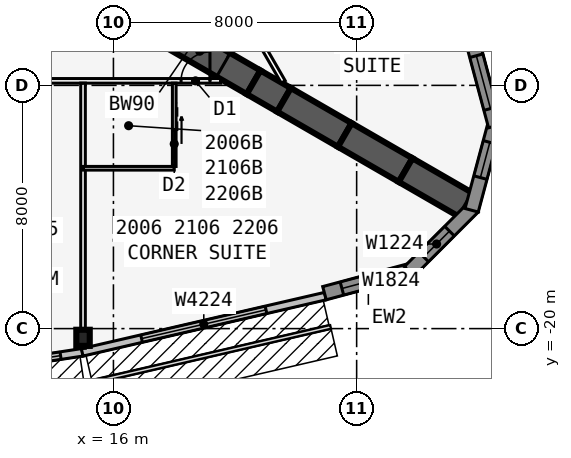
"""IFC4 building model, lengths in metres.
Left out: names, types, materials, properties, quantities, classifications, styles, units other than length and angle.
Written with IfcOpenShell. Run it as: python <this file> out.ifc"""

import sys

from ifc_helpers import new_model, si_unit, direction, frame, frame_2d, origin, origin_2d, place, context, subcontext, project, spatial, polyline, rectangle, i_section, outline, extrude, element, fill, save


model = new_model("IFC4")
c1 = context("Model", 3, precision=1e-05, world=origin(), true_north=direction((0.0, 1.0)))
c2 = subcontext(c1, "Body", "Model", "MODEL_VIEW")
j1 = project(units=[si_unit("LENGTHUNIT", "METRE"), si_unit("PLANEANGLEUNIT", "RADIAN")], contexts=[c1])
p1 = place(None, origin())
s1 = spatial("IfcSite", under=j1, at=p1, CompositionType="ELEMENT")
p2 = place(p1, origin())
s2 = spatial("IfcBuilding", under=s1, at=p2, CompositionType="ELEMENT")
p3 = place(p2, frame((0.0, 0.0, 79.5)))
s3 = spatial("IfcBuildingStorey", under=s2, at=p3, CompositionType="ELEMENT", Elevation=79.5)
p4 = place(p3, frame((16.5, -9.526, 0.0), z_axis=(0.0, 0.0, 1.0), x_axis=(0.866031398331, -0.499989616998, 0.0)))
e1 = element("IfcWall", 1, at=p4, inside=s3, PredefinedType="SHEAR", context=c2, shape_type="SweptSolid", body=[
    extrude(rectangle(XDim=4.746, YDim=0.9, at=frame_2d((2.373, 0.0))), origin(), (0.0, 0.0, 1.0), 3.4),
])
p5 = place(p4, frame((1.8, 0.0, 0.0)))
e2 = element("IfcOpeningElement", 2, at=p5, cuts=e1, PredefinedType="OPENING", context=c2, shape_type="SweptSolid", body=[
    extrude(rectangle(XDim=1.8, YDim=2.13, at=frame_2d((0.9, 1.065))), frame((0.0, 0.46, 0.0), z_axis=(0.0, -1.0, 0.0), x_axis=(1.0, 0.0, 0.0)), (0.0, 0.0, 1.0), 0.92),
])
p6 = place(p3, frame((20.61, -11.899, 0.0), z_axis=(0.0, 0.0, 1.0), x_axis=(0.866009537788, -0.500027479704, 0.0)))
e3 = element("IfcWall", 3, at=p6, inside=s3, PredefinedType="SHEAR", context=c2, shape_type="SweptSolid", body=[
    extrude(rectangle(XDim=1.155, YDim=0.9, at=frame_2d((0.577, 0.0))), origin(), (0.0, 0.0, 1.0), 3.4),
])
for number, where, z_axis, x_axis in (
    (4, (21.61, -12.477, 0.0), (0.0, 0.0, 1.0), (0.866, -0.5, 0.0)),
    (5, (23.61, -13.631, 0.0), (0.0, 0.0, 1.0), (0.866, -0.5, 0.0)),
    (6, (25.61, -14.786, 0.0), (0.0, 0.0, 1.0), (0.866, -0.5, 0.0)),
):
    element("IfcWall", number, at=place(p3, frame(where, z_axis=z_axis, x_axis=x_axis)), inside=s3, PredefinedType="SHEAR", context=c2, shape_type="SweptSolid", body=[
        extrude(rectangle(XDim=2.309, YDim=0.9, at=frame_2d((1.155, 0.0))), origin(), (0.0, 0.0, 1.0), 3.4),
    ])
p7 = place(p3, frame((15.0, -20.303, 0.0), z_axis=(0.0, 0.0, 1.0), x_axis=(1.0, 0.0, 0.0)))
e7 = element("IfcColumn", 7, at=p7, inside=s3, PredefinedType="COLUMN", context=c2, shape_type="SweptSolid", body=[
    extrude(i_section(OverallWidth=0.442, OverallDepth=0.531, WebThickness=0.066, FlangeThickness=0.106, at=origin_2d()), origin(), (0.0, 0.0, 1.0), 3.4),
])
p8 = place(p3, frame((9.981, -21.54, 0.0), z_axis=(0.0, 0.0, 1.0), x_axis=(0.988615403399, 0.150464561152, 0.0)))
e8 = element("IfcWall", 8, at=p8, inside=s3, PredefinedType="STANDARD", context=c2, shape_type="SweptSolid", body=[
    extrude(rectangle(XDim=5.058, YDim=0.25, at=frame_2d((2.529, 0.0))), origin(), (0.0, 0.0, 1.0), 3.235),
])
p9 = place(p8, frame((0.729, 0.0, 0.45)))
e9 = element("IfcOpeningElement", 9, at=p9, cuts=e8, PredefinedType="OPENING", context=c2, shape_type="SweptSolid", body=[
    extrude(rectangle(XDim=3.6, YDim=2.4, at=frame_2d((1.8, 1.2))), frame((0.0, 0.135, 0.0), z_axis=(0.0, -1.0, 0.0), x_axis=(1.0, 0.0, 0.0)), (0.0, 0.0, 1.0), 0.27),
])
p10 = place(p3, frame((14.972, -20.781, 0.0), z_axis=(0.0, 0.0, 1.0), x_axis=(0.974279327392, 0.225343720163, 0.0)))
e10 = element("IfcWall", 10, at=p10, inside=s3, PredefinedType="STANDARD", context=c2, shape_type="SweptSolid", body=[
    extrude(rectangle(XDim=8.211, YDim=0.25, at=frame_2d((4.105, 0.0))), origin(), (0.0, 0.0, 1.0), 3.235),
])
p11 = place(p10, frame((2.006, 0.0, 0.45)))
e11 = element("IfcOpeningElement", 11, at=p11, cuts=e10, PredefinedType="OPENING", context=c2, shape_type="SweptSolid", body=[
    extrude(rectangle(XDim=4.2, YDim=2.4, at=frame_2d((2.1, 1.2))), frame((0.0, 0.135, 0.0), z_axis=(0.0, -1.0, 0.0), x_axis=(1.0, 0.0, 0.0)), (0.0, 0.0, 1.0), 0.27),
])
p12 = place(p3, frame((22.942, -18.835, 0.0), z_axis=(0.0, 0.0, 1.0), x_axis=(0.965930548995, 0.258801419081, 0.0)))
e12 = element("IfcWall", 12, at=p12, inside=s3, PredefinedType="SOLIDWALL", context=c2, shape_type="SweptSolid", body=[
    extrude(rectangle(XDim=2.989, YDim=0.45, at=frame_2d((1.494, 0.0))), origin(), (0.0, 0.0, 1.0), 3.235),
])
p13 = place(p12, frame((0.594, 0.0, 0.45)))
e13 = element("IfcOpeningElement", 13, at=p13, cuts=e12, PredefinedType="OPENING", context=c2, shape_type="SweptSolid", body=[
    extrude(rectangle(XDim=1.8, YDim=2.4, at=frame_2d((0.9, 1.2))), frame((0.0, 0.235, 0.0), z_axis=(0.0, -1.0, 0.0), x_axis=(1.0, 0.0, 0.0)), (0.0, 0.0, 1.0), 0.47),
])
p14 = place(p3, frame((25.728, -18.12, 0.0), z_axis=(0.0, 0.0, 1.0), x_axis=(0.707025086683, 0.707188466253, 0.0)))
e14 = element("IfcWall", 14, at=p14, inside=s3, PredefinedType="SOLIDWALL", context=c2, shape_type="SweptSolid", body=[
    extrude(outline(polyline([(2.989, 0.225), (2.93, 0.225), (2.438, 0.093), (2.402, 0.225), (0.0, 0.225), (0.0, -0.225), (2.989, -0.225), (2.989, 0.225)])), origin(), (0.0, 0.0, 1.0), 3.235),
])
p15 = place(p14, frame((0.676, 0.0, 0.45)))
e15 = element("IfcOpeningElement", 15, at=p15, cuts=e14, PredefinedType="OPENING", context=c2, shape_type="SweptSolid", body=[
    extrude(rectangle(XDim=1.2, YDim=2.4, at=frame_2d((0.6, 1.2))), frame((0.0, 0.235, 0.0), z_axis=(0.0, -1.0, 0.0), x_axis=(1.0, 0.0, 0.0)), (0.0, 0.0, 1.0), 0.47),
])
p16 = place(p3, frame((27.783, -16.108, 0.0), z_axis=(0.0, 0.0, 1.0), x_axis=(0.258801419081, 0.965930548995, 0.0)))
e16 = element("IfcWall", 16, at=p16, inside=s3, PredefinedType="SOLIDWALL", context=c2, shape_type="SweptSolid", body=[
    extrude(outline(polyline([(2.989, 0.225), (0.586, 0.225), (0.551, 0.093), (0.06, 0.225), (0.0, 0.225), (0.0, -0.225), (2.989, -0.225), (2.989, 0.225)])), origin(), (0.0, 0.0, 1.0), 3.235),
])
p17 = place(p16, frame((1.113, 0.0, 0.45)))
e17 = element("IfcOpeningElement", 17, at=p17, cuts=e16, PredefinedType="OPENING", context=c2, shape_type="SweptSolid", body=[
    extrude(rectangle(XDim=1.2, YDim=2.4, at=frame_2d((0.6, 1.2))), frame((0.0, 0.235, 0.0), z_axis=(0.0, -1.0, 0.0), x_axis=(1.0, 0.0, 0.0)), (0.0, 0.0, 1.0), 0.47),
])
p18 = place(p3, frame((28.556, -13.337, 0.0), z_axis=(0.0, 0.0, 1.0), x_axis=(-0.258780998834, 0.965936019953, 0.0)))
e18 = element("IfcWall", 18, at=p18, inside=s3, PredefinedType="SOLIDWALL", context=c2, shape_type="SweptSolid", body=[
    extrude(rectangle(XDim=2.989, YDim=0.45, at=frame_2d((1.494, 0.0))), origin(), (0.0, 0.0, 1.0), 3.235),
])
p19 = place(p18, frame((0.594, 0.0, 0.45)))
e19 = element("IfcOpeningElement", 19, at=p19, cuts=e18, PredefinedType="OPENING", context=c2, shape_type="SweptSolid", body=[
    extrude(rectangle(XDim=1.8, YDim=2.4, at=frame_2d((0.9, 1.2))), frame((0.0, 0.235, 0.0), z_axis=(0.0, -1.0, 0.0), x_axis=(1.0, 0.0, 0.0)), (0.0, 0.0, 1.0), 0.47),
])
p20 = place(p3, frame((-19.527, -11.851, 0.0), z_axis=(0.0, 0.0, 1.0), x_axis=(1.0, 0.0, 0.0)))
e20 = element("IfcWall", 20, at=p20, inside=s3, PredefinedType="PARTITIONING", context=c2, shape_type="SweptSolid", body=[
    extrude(rectangle(XDim=39.054, YDim=0.15, at=frame_2d((19.527, 0.0))), origin(), (0.0, 0.0, 1.0), 3.235),
])
p21 = place(p20, frame((0.352, 0.0, 0.0)))
e21 = element("IfcOpeningElement", 21, at=p21, cuts=e20, PredefinedType="OPENING", context=c2, shape_type="SweptSolid", body=[
    extrude(rectangle(XDim=0.95, YDim=2.13, at=frame_2d((0.475, 1.065))), frame((0.0, 0.085, 0.0), z_axis=(0.0, -1.0, 0.0), x_axis=(1.0, 0.0, 0.0)), (0.0, 0.0, 1.0), 0.17),
])
p22 = place(p20, frame((7.752, 0.0, 0.0)))
e22 = element("IfcOpeningElement", 22, at=p22, cuts=e20, PredefinedType="OPENING", context=c2, shape_type="SweptSolid", body=[
    extrude(rectangle(XDim=0.95, YDim=2.13, at=frame_2d((0.475, 1.065))), frame((0.0, 0.085, 0.0), z_axis=(0.0, -1.0, 0.0), x_axis=(1.0, 0.0, 0.0)), (0.0, 0.0, 1.0), 0.17),
])
p23 = place(p20, frame((17.752, 0.0, 0.0)))
e23 = element("IfcOpeningElement", 23, at=p23, cuts=e20, PredefinedType="OPENING", context=c2, shape_type="SweptSolid", body=[
    extrude(rectangle(XDim=0.95, YDim=2.13, at=frame_2d((0.475, 1.065))), frame((0.0, 0.085, 0.0), z_axis=(0.0, -1.0, 0.0), x_axis=(1.0, 0.0, 0.0)), (0.0, 0.0, 1.0), 0.17),
])
p24 = place(p20, frame((21.527, 0.0, 0.0)))
e24 = element("IfcOpeningElement", 24, at=p24, cuts=e20, PredefinedType="OPENING", context=c2, shape_type="SweptSolid", body=[
    extrude(rectangle(XDim=1.0, YDim=2.13, at=frame_2d((0.5, 1.065))), frame((0.0, 0.085, 0.0), z_axis=(0.0, -1.0, 0.0), x_axis=(1.0, 0.0, 0.0)), (0.0, 0.0, 1.0), 0.17),
])
p25 = place(p20, frame((27.152, 0.0, 0.0)))
e25 = element("IfcOpeningElement", 25, at=p25, cuts=e20, PredefinedType="OPENING", context=c2, shape_type="SweptSolid", body=[
    extrude(rectangle(XDim=0.95, YDim=2.13, at=frame_2d((0.475, 1.065))), frame((0.0, 0.085, 0.0), z_axis=(0.0, -1.0, 0.0), x_axis=(1.0, 0.0, 0.0)), (0.0, 0.0, 1.0), 0.17),
])
p26 = place(p20, frame((32.152, 0.0, 0.0)))
e26 = element("IfcOpeningElement", 26, at=p26, cuts=e20, PredefinedType="OPENING", context=c2, shape_type="SweptSolid", body=[
    extrude(rectangle(XDim=0.95, YDim=2.13, at=frame_2d((0.475, 1.065))), frame((0.0, 0.085, 0.0), z_axis=(0.0, -1.0, 0.0), x_axis=(1.0, 0.0, 0.0)), (0.0, 0.0, 1.0), 0.17),
])
p27 = place(p20, frame((37.752, 0.0, 0.0)))
e27 = element("IfcOpeningElement", 27, at=p27, cuts=e20, PredefinedType="OPENING", context=c2, shape_type="SweptSolid", body=[
    extrude(rectangle(XDim=0.95, YDim=2.13, at=frame_2d((0.475, 1.065))), frame((0.0, 0.085, 0.0), z_axis=(0.0, -1.0, 0.0), x_axis=(1.0, 0.0, 0.0)), (0.0, 0.0, 1.0), 0.17),
])
p28 = place(p3, frame((15.0, -11.926, 0.0), z_axis=(0.0, 0.0, 1.0), x_axis=(0.0, -1.0, 0.0)))
e28 = element("IfcWall", 28, at=p28, inside=s3, PredefinedType="PARTITIONING", context=c2, shape_type="SweptSolid", body=[
    extrude(rectangle(XDim=8.72, YDim=0.15, at=frame_2d((4.36, 0.0))), origin(), (0.0, 0.0, 1.0), 2.389),
])
p29 = place(p3, frame((15.0, -14.726, 0.0), z_axis=(0.0, 0.0, 1.0), x_axis=(1.0, 0.0, 0.0)))
e29 = element("IfcWall", 29, at=p29, inside=s3, PredefinedType="PLUMBINGWALL", context=c2, shape_type="SweptSolid", body=[
    extrude(rectangle(XDim=3.0, YDim=0.12, at=frame_2d((1.5, 0.0))), origin(), (0.0, 0.0, 1.0), 3.235),
])
p30 = place(p3, frame((18.0, -11.926, 0.0), z_axis=(0.0, 0.0, 1.0), x_axis=(0.0, -1.0, 0.0)))
e30 = element("IfcWall", 30, at=p30, inside=s3, PredefinedType="PLUMBINGWALL", context=c2, shape_type="SweptSolid", body=[
    extrude(rectangle(XDim=2.74, YDim=0.12, at=frame_2d((1.37, 0.0))), origin(), (0.0, 0.0, 1.0), 3.235),
])
p31 = place(p30, frame((1.55, 0.0, 0.0)))
e31 = element("IfcOpeningElement", 31, at=p31, cuts=e30, PredefinedType="OPENING", context=c2, shape_type="SweptSolid", body=[
    extrude(rectangle(XDim=0.9, YDim=2.13, at=frame_2d((0.45, 1.065))), frame((0.0, 0.07, 0.0), z_axis=(0.0, -1.0, 0.0), x_axis=(1.0, 0.0, 0.0)), (0.0, 0.0, 1.0), 0.14),
])
p32 = place(p3, frame((21.586, -11.885, 0.0), z_axis=(0.0, 0.0, 1.0), x_axis=(-0.500001915564, 0.86602429783, 0.0)))
e32 = element("IfcWall", 32, at=p32, inside=s3, PredefinedType="PARTITIONING", context=c2, shape_type="SweptSolid", body=[
    extrude(rectangle(XDim=42.172, YDim=0.15, at=frame_2d((21.086, 0.0))), origin(), (0.0, 0.0, 1.0), 3.235),
])
p33 = place(p32, frame((1.911, 0.0, 0.0)))
e33 = element("IfcOpeningElement", 33, at=p33, cuts=e32, PredefinedType="OPENING", context=c2, shape_type="SweptSolid", body=[
    extrude(rectangle(XDim=0.95, YDim=2.13, at=frame_2d((0.475, 1.065))), frame((0.0, 0.085, 0.0), z_axis=(0.0, -1.0, 0.0), x_axis=(1.0, 0.0, 0.0)), (0.0, 0.0, 1.0), 0.17),
])
p34 = place(p32, frame((8.711, 0.0, 0.0)))
e34 = element("IfcOpeningElement", 34, at=p34, cuts=e32, PredefinedType="OPENING", context=c2, shape_type="SweptSolid", body=[
    extrude(rectangle(XDim=0.95, YDim=2.13, at=frame_2d((0.475, 1.065))), frame((0.0, 0.085, 0.0), z_axis=(0.0, -1.0, 0.0), x_axis=(1.0, 0.0, 0.0)), (0.0, 0.0, 1.0), 0.17),
])
p35 = place(p32, frame((13.111, 0.0, 0.0)))
e35 = element("IfcOpeningElement", 35, at=p35, cuts=e32, PredefinedType="OPENING", context=c2, shape_type="SweptSolid", body=[
    extrude(rectangle(XDim=0.95, YDim=2.13, at=frame_2d((0.475, 1.065))), frame((0.0, 0.085, 0.0), z_axis=(0.0, -1.0, 0.0), x_axis=(1.0, 0.0, 0.0)), (0.0, 0.0, 1.0), 0.17),
])
p36 = place(p32, frame((23.711, 0.0, 0.0)))
e36 = element("IfcOpeningElement", 36, at=p36, cuts=e32, PredefinedType="OPENING", context=c2, shape_type="SweptSolid", body=[
    extrude(rectangle(XDim=0.95, YDim=2.13, at=frame_2d((0.475, 1.065))), frame((0.0, 0.085, 0.0), z_axis=(0.0, -1.0, 0.0), x_axis=(1.0, 0.0, 0.0)), (0.0, 0.0, 1.0), 0.17),
])
p37 = place(p32, frame((29.311, 0.0, 0.0)))
e37 = element("IfcOpeningElement", 37, at=p37, cuts=e32, PredefinedType="OPENING", context=c2, shape_type="SweptSolid", body=[
    extrude(rectangle(XDim=0.95, YDim=2.13, at=frame_2d((0.475, 1.065))), frame((0.0, 0.085, 0.0), z_axis=(0.0, -1.0, 0.0), x_axis=(1.0, 0.0, 0.0)), (0.0, 0.0, 1.0), 0.17),
])
p38 = place(p32, frame((39.311, 0.0, 0.0)))
e38 = element("IfcOpeningElement", 38, at=p38, cuts=e32, PredefinedType="OPENING", context=c2, shape_type="SweptSolid", body=[
    extrude(rectangle(XDim=0.95, YDim=2.13, at=frame_2d((0.475, 1.065))), frame((0.0, 0.085, 0.0), z_axis=(0.0, -1.0, 0.0), x_axis=(1.0, 0.0, 0.0)), (0.0, 0.0, 1.0), 0.17),
])
p39 = place(p9, origin())
e39 = element("IfcWindow", 39, at=p39, inside=s3, PartitioningType="SINGLE_PANEL", PredefinedType="WINDOW", context=c2, shape_type="SweptSolid", body=[
    extrude(rectangle(XDim=3.6, YDim=2.4, at=frame_2d((1.8, 1.2))), frame((0.0, 0.03, 0.0), z_axis=(0.0, -1.0, 0.0), x_axis=(1.0, 0.0, 0.0)), (0.0, 0.0, 1.0), 0.06),
])
fill(e9, e39)
p40 = place(p11, origin())
e40 = element("IfcWindow", 40, at=p40, inside=s3, PartitioningType="SINGLE_PANEL", PredefinedType="WINDOW", context=c2, shape_type="SweptSolid", body=[
    extrude(rectangle(XDim=4.2, YDim=2.4, at=frame_2d((2.1, 1.2))), frame((0.0, 0.03, 0.0), z_axis=(0.0, -1.0, 0.0), x_axis=(1.0, 0.0, 0.0)), (0.0, 0.0, 1.0), 0.06),
])
fill(e11, e40)
p41 = place(p13, origin())
e41 = element("IfcWindow", 41, at=p41, inside=s3, PartitioningType="SINGLE_PANEL", PredefinedType="WINDOW", context=c2, shape_type="SweptSolid", body=[
    extrude(rectangle(XDim=1.8, YDim=2.4, at=frame_2d((0.9, 1.2))), frame((0.0, 0.03, 0.0), z_axis=(0.0, -1.0, 0.0), x_axis=(1.0, 0.0, 0.0)), (0.0, 0.0, 1.0), 0.06),
])
fill(e13, e41)
p42 = place(p15, origin())
e42 = element("IfcWindow", 42, at=p42, inside=s3, PartitioningType="SINGLE_PANEL", PredefinedType="WINDOW", context=c2, shape_type="SweptSolid", body=[
    extrude(rectangle(XDim=1.2, YDim=2.4, at=frame_2d((0.6, 1.2))), frame((0.0, 0.03, 0.0), z_axis=(0.0, -1.0, 0.0), x_axis=(1.0, 0.0, 0.0)), (0.0, 0.0, 1.0), 0.06),
])
fill(e15, e42)
p43 = place(p17, origin())
e43 = element("IfcWindow", 43, at=p43, inside=s3, PartitioningType="SINGLE_PANEL", PredefinedType="WINDOW", context=c2, shape_type="SweptSolid", body=[
    extrude(rectangle(XDim=1.2, YDim=2.4, at=frame_2d((0.6, 1.2))), frame((0.0, 0.03, 0.0), z_axis=(0.0, -1.0, 0.0), x_axis=(1.0, 0.0, 0.0)), (0.0, 0.0, 1.0), 0.06),
])
fill(e17, e43)
p44 = place(p19, origin())
e44 = element("IfcWindow", 44, at=p44, inside=s3, PartitioningType="SINGLE_PANEL", PredefinedType="WINDOW", context=c2, shape_type="SweptSolid", body=[
    extrude(rectangle(XDim=1.8, YDim=2.4, at=frame_2d((0.9, 1.2))), frame((0.0, 0.03, 0.0), z_axis=(0.0, -1.0, 0.0), x_axis=(1.0, 0.0, 0.0)), (0.0, 0.0, 1.0), 0.06),
])
fill(e19, e44)
p45 = place(p31, origin())
e45 = element("IfcDoor", 45, at=p45, inside=s3, OperationType="SLIDING_TO_LEFT", PredefinedType="DOOR", context=c2, shape_type="SweptSolid", body=[
    extrude(rectangle(XDim=0.9, YDim=2.13, at=frame_2d((0.45, 1.065))), frame((0.0, 0.025, 0.0), z_axis=(0.0, -1.0, 0.0), x_axis=(1.0, 0.0, 0.0)), (0.0, 0.0, 1.0), 0.05),
])
fill(e31, e45)
p46 = place(p27, origin())
e46 = element("IfcDoor", 46, at=p46, inside=s3, OperationType="SINGLE_SWING_RIGHT", PredefinedType="DOOR", context=c2, shape_type="SweptSolid", body=[
    extrude(rectangle(XDim=0.95, YDim=2.13, at=frame_2d((0.475, 1.065))), frame((0.0, 0.025, 0.0), z_axis=(0.0, -1.0, 0.0), x_axis=(1.0, 0.0, 0.0)), (0.0, 0.0, 1.0), 0.05),
])
fill(e27, e46)
p47 = place(p5, origin())
e47 = element("IfcDoor", 47, at=p47, inside=s3, OperationType="DOUBLE_DOOR_DOUBLE_SWING", PredefinedType="DOOR", context=c2, shape_type="SweptSolid", body=[
    extrude(rectangle(XDim=1.8, YDim=2.13, at=frame_2d((0.9, 1.065))), frame((0.0, 0.025, 0.0), z_axis=(0.0, -1.0, 0.0), x_axis=(1.0, 0.0, 0.0)), (0.0, 0.0, 1.0), 0.05),
])
fill(e2, e47)
save(model, sys.argv[1])
